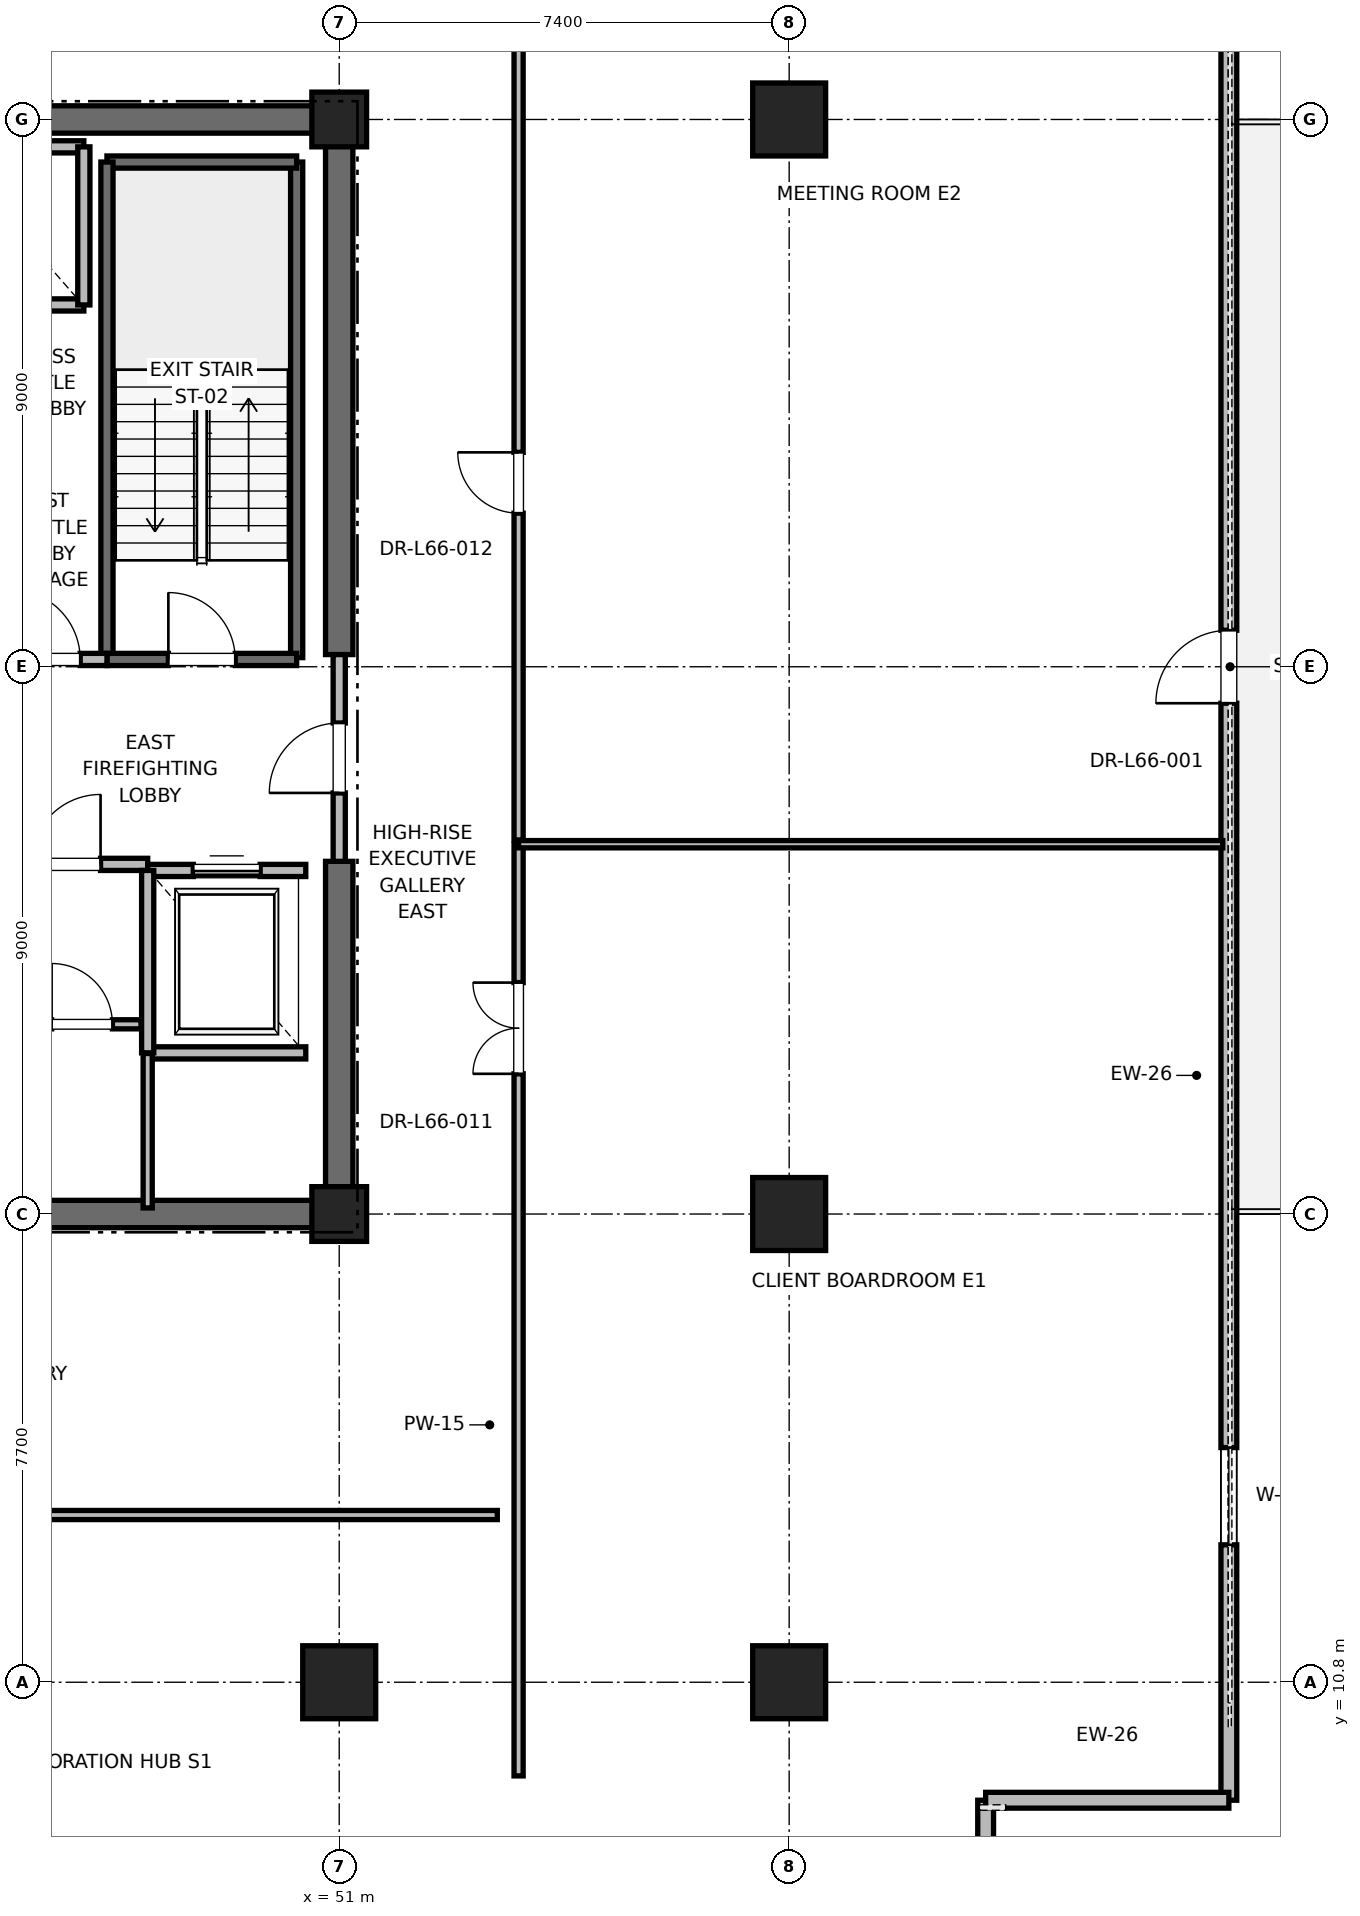
"""IFC4 building model, lengths in metres.
Left out: names, types, materials, properties, quantities, classifications, styles, units other than length and angle.
Written with IfcOpenShell. Run it as: python <this file> out.ifc"""

import sys

from ifc_helpers import new_model, si_unit, direction, frame, frame_2d, origin, origin_2d, place, context, subcontext, project, spatial, rectangle, extrude, element, fill, save


model = new_model("IFC4")
c1 = context("Model", 3, precision=1e-05, world=origin(), true_north=direction((0.0, 1.0)))
c2 = subcontext(c1, "Body", "Model", "MODEL_VIEW")
j1 = project(units=[si_unit("LENGTHUNIT", "METRE"), si_unit("PLANEANGLEUNIT", "RADIAN")], contexts=[c1])
p1 = place(None, origin())
s1 = spatial("IfcSite", under=j1, at=p1, CompositionType="ELEMENT")
p2 = place(p1, origin())
s2 = spatial("IfcBuilding", under=s1, at=p2, CompositionType="ELEMENT")
p3 = place(p2, frame((0.0, 0.0, 283.2)))
s3 = spatial("IfcBuildingStorey", under=s2, at=p3, CompositionType="ELEMENT", Elevation=283.2)
for number, where, z_axis, x_axis in (
    (1, (51.0, 10.8, 0.0), (0.0, 0.0, 1.0), (1.0, 0.0, 0.0)),
    (2, (58.4, 18.5, 0.0), (0.0, 0.0, 1.0), (1.0, 0.0, 0.0)),
    (3, (58.4, 36.5, 0.0), (0.0, 0.0, 1.0), (1.0, 0.0, 0.0)),
    (4, (58.4, 10.8, 0.0), (0.0, 0.0, 1.0), (1.0, 0.0, 0.0)),
):
    element("IfcColumn", number, at=place(p3, frame(where, z_axis=z_axis, x_axis=x_axis)), inside=s3, PredefinedType="COLUMN", context=c2, shape_type="SweptSolid", body=[
        extrude(rectangle(XDim=1.2, YDim=1.2, at=origin_2d()), origin(), (0.0, 0.0, 1.0), 4.0),
    ])
for number, where, z_axis, x_axis in (
    (5, (51.0, 18.5, 0.0), (0.0, 0.0, 1.0), (1.0, 0.0, 0.0)),
    (6, (51.0, 36.5, 0.0), (0.0, 0.0, 1.0), (1.0, 0.0, 0.0)),
):
    element("IfcColumn", number, at=place(p3, frame(where, z_axis=z_axis, x_axis=x_axis)), inside=s3, PredefinedType="PILASTER", context=c2, shape_type="SweptSolid", body=[
        extrude(rectangle(XDim=0.9, YDim=0.9, at=origin_2d()), origin(), (0.0, 0.0, 1.0), 4.0),
    ])
p4 = place(p3, frame((41.8, 18.5, 0.0), z_axis=(0.0, 0.0, 1.0), x_axis=(1.0, 0.0, 0.0)))
e7 = element("IfcWall", 7, at=p4, inside=s3, PredefinedType="SHEAR", context=c2, shape_type="SweptSolid", body=[
    extrude(rectangle(XDim=9.2, YDim=0.45, at=frame_2d((4.6, 0.0))), origin(), (0.0, 0.0, 1.0), 3.785),
])
for number, where, z_axis, x_axis in (
    (8, (45.2, 36.5, 0.0), (0.0, 0.0, 1.0), (1.0, 0.0, 0.0)),
    (9, (51.0, 18.5, 0.0), (0.0, 0.0, 1.0), (0.0, 1.0, 0.0)),
):
    element("IfcWall", number, at=place(p3, frame(where, z_axis=z_axis, x_axis=x_axis)), inside=s3, PredefinedType="SHEAR", context=c2, shape_type="SweptSolid", body=[
        extrude(rectangle(XDim=5.8, YDim=0.45, at=frame_2d((2.9, 0.0))), origin(), (0.0, 0.0, 1.0), 3.785),
    ])
p5 = place(p3, frame((51.0, 27.7, 0.0), z_axis=(0.0, 0.0, 1.0), x_axis=(0.0, 1.0, 0.0)))
e10 = element("IfcWall", 10, at=p5, inside=s3, PredefinedType="SHEAR", context=c2, shape_type="SweptSolid", body=[
    extrude(rectangle(XDim=8.8, YDim=0.45, at=frame_2d((4.4, 0.0))), origin(), (0.0, 0.0, 1.0), 3.785),
])
p6 = place(p3, frame((65.631, 8.86, 0.0), z_axis=(0.0, 0.0, 1.0), x_axis=(0.0, 1.0, 0.0)))
e11 = element("IfcWall", 11, at=p6, inside=s3, PredefinedType="PARAPET", context=c2, shape_type="SweptSolid", body=[
    extrude(rectangle(XDim=37.281, YDim=0.26, at=frame_2d((18.64, 0.0))), origin(), (0.0, 0.0, 1.0), 3.123),
])
p7 = place(p6, frame((4.2, 0.0, 0.85)))
e12 = element("IfcOpeningElement", 12, at=p7, cuts=e11, PredefinedType="OPENING", context=c2, shape_type="SweptSolid", body=[
    extrude(rectangle(XDim=1.6, YDim=2.1, at=frame_2d((0.8, 1.05))), frame((0.0, 0.13, 0.0), z_axis=(0.0, -1.0, 0.0), x_axis=(1.0, 0.0, 0.0)), (0.0, 0.0, 1.0), 0.26),
])
p8 = place(p6, frame((18.04, 0.0, 0.0)))
e13 = element("IfcOpeningElement", 13, at=p8, cuts=e11, PredefinedType="OPENING", context=c2, shape_type="SweptSolid", body=[
    extrude(rectangle(XDim=1.2, YDim=2.2, at=frame_2d((0.6, 1.1))), frame((0.0, 0.13, 0.0), z_axis=(0.0, -1.0, 0.0), x_axis=(1.0, 0.0, 0.0)), (0.0, 0.0, 1.0), 0.26),
])
p9 = place(p6, frame((31.481, 0.0, 0.85)))
e14 = element("IfcOpeningElement", 14, at=p9, cuts=e11, PredefinedType="OPENING", context=c2, shape_type="SweptSolid", body=[
    extrude(rectangle(XDim=1.6, YDim=2.1, at=frame_2d((0.8, 1.05))), frame((0.0, 0.13, 0.0), z_axis=(0.0, -1.0, 0.0), x_axis=(1.0, 0.0, 0.0)), (0.0, 0.0, 1.0), 0.26),
])
p10 = place(p3, frame((61.631, 5.36, 0.0), z_axis=(0.0, 0.0, 1.0), x_axis=(0.0, 1.0, 0.0)))
e15 = element("IfcWall", 15, at=p10, inside=s3, PredefinedType="PARAPET", context=c2, shape_type="SweptSolid", body=[
    extrude(rectangle(XDim=3.5, YDim=0.26, at=frame_2d((1.75, 0.0))), origin(), (0.0, 0.0, 1.0), 3.785),
])
p11 = place(p10, frame((0.85, 0.0, 0.85)))
e16 = element("IfcOpeningElement", 16, at=p11, cuts=e15, PredefinedType="OPENING", context=c2, shape_type="SweptSolid", body=[
    extrude(rectangle(XDim=1.8, YDim=2.2, at=frame_2d((0.9, 1.1))), frame((0.0, 0.13, 0.0), z_axis=(0.0, -1.0, 0.0), x_axis=(1.0, 0.0, 0.0)), (0.0, 0.0, 1.0), 0.26),
])
p12 = place(p3, frame((61.631, 8.86, 0.0), z_axis=(0.0, 0.0, 1.0), x_axis=(1.0, 0.0, 0.0)))
e17 = element("IfcWall", 17, at=p12, inside=s3, PredefinedType="PARAPET", context=c2, shape_type="SweptSolid", body=[
    extrude(rectangle(XDim=4.0, YDim=0.26, at=frame_2d((2.0, 0.0))), origin(), (0.0, 0.0, 1.0), 3.785),
])
p13 = place(p3, frame((50.3, 27.65, 0.0), z_axis=(0.0, 0.0, 1.0), x_axis=(0.0, 1.0, 0.0)))
e18 = element("IfcWall", 18, at=p13, inside=s3, PredefinedType="SOLIDWALL", context=c2, shape_type="SweptSolid", body=[
    extrude(rectangle(XDim=8.15, YDim=0.2, at=frame_2d((4.075, 0.0))), origin(), (0.0, 0.0, 1.0), 3.785),
])
p14 = place(p3, frame((47.18, 35.8, 0.0), z_axis=(0.0, 0.0, 1.0), x_axis=(1.0, 0.0, 0.0)))
e19 = element("IfcWall", 19, at=p14, inside=s3, PredefinedType="SOLIDWALL", context=c2, shape_type="SweptSolid", body=[
    extrude(rectangle(XDim=3.12, YDim=0.2, at=frame_2d((1.56, 0.0))), origin(), (0.0, 0.0, 1.0), 3.785),
])
p15 = place(p3, frame((47.18, 27.62, 0.0), z_axis=(0.0, 0.0, 1.0), x_axis=(0.0, 1.0, 0.0)))
e20 = element("IfcWall", 20, at=p15, inside=s3, PredefinedType="SOLIDWALL", context=c2, shape_type="SweptSolid", body=[
    extrude(rectangle(XDim=8.18, YDim=0.2, at=frame_2d((4.09, 0.0))), origin(), (0.0, 0.0, 1.0), 3.785),
])
p16 = place(p3, frame((47.18, 27.62, 0.0), z_axis=(0.0, 0.0, 1.0), x_axis=(1.0, 0.0, 0.0)))
e21 = element("IfcWall", 21, at=p16, inside=s3, PredefinedType="SOLIDWALL", context=c2, shape_type="SweptSolid", body=[
    extrude(rectangle(XDim=3.12, YDim=0.2, at=frame_2d((1.56, 0.0))), origin(), (0.0, 0.0, 1.0), 3.785),
])
p17 = place(p16, frame((1.01, 0.0, 0.0)))
e22 = element("IfcOpeningElement", 22, at=p17, cuts=e21, PredefinedType="OPENING", context=c2, shape_type="SweptSolid", body=[
    extrude(rectangle(XDim=1.1, YDim=2.15, at=frame_2d((0.55, 1.075))), frame((0.0, 0.1, 0.0), z_axis=(0.0, -1.0, 0.0), x_axis=(1.0, 0.0, 0.0)), (0.0, 0.0, 1.0), 0.2),
])
p18 = place(p3, frame((45.15, 24.25, 0.0), z_axis=(0.0, 0.0, 1.0), x_axis=(1.0, 0.0, 0.0)))
e23 = element("IfcWall", 23, at=p18, inside=s3, PredefinedType="PARTITIONING", context=c2, shape_type="SweptSolid", body=[
    extrude(rectangle(XDim=2.7, YDim=0.2, at=frame_2d((1.35, 0.0))), origin(), (0.0, 0.0, 1.0), 3.785),
])
p19 = place(p18, frame((0.775, 0.0, 0.0)))
e24 = element("IfcOpeningElement", 24, at=p19, cuts=e23, PredefinedType="OPENING", context=c2, shape_type="SweptSolid", body=[
    extrude(rectangle(XDim=1.15, YDim=2.2, at=frame_2d((0.575, 1.1))), frame((0.0, 0.1, 0.0), z_axis=(0.0, -1.0, 0.0), x_axis=(1.0, 0.0, 0.0)), (0.0, 0.0, 1.0), 0.2),
])
p20 = place(p3, frame((45.15, 27.62, 0.0), z_axis=(0.0, 0.0, 1.0), x_axis=(1.0, 0.0, 0.0)))
e25 = element("IfcWall", 25, at=p20, inside=s3, PredefinedType="PARTITIONING", context=c2, shape_type="SweptSolid", body=[
    extrude(rectangle(XDim=2.03, YDim=0.2, at=frame_2d((1.015, 0.0))), origin(), (0.0, 0.0, 1.0), 3.785),
])
p21 = place(p20, frame((0.44, 0.0, 0.0)))
e26 = element("IfcOpeningElement", 26, at=p21, cuts=e25, PredefinedType="OPENING", context=c2, shape_type="SweptSolid", body=[
    extrude(rectangle(XDim=1.15, YDim=2.2, at=frame_2d((0.575, 1.1))), frame((0.0, 0.1, 0.0), z_axis=(0.0, -1.0, 0.0), x_axis=(1.0, 0.0, 0.0)), (0.0, 0.0, 1.0), 0.2),
])
p22 = place(p3, frame((51.0, 24.3, 0.0), z_axis=(0.0, 0.0, 1.0), x_axis=(0.0, 1.0, 0.0)))
e27 = element("IfcWall", 27, at=p22, inside=s3, PredefinedType="PARTITIONING", context=c2, shape_type="SweptSolid", body=[
    extrude(rectangle(XDim=3.4, YDim=0.2, at=frame_2d((1.7, 0.0))), origin(), (0.0, 0.0, 1.0), 2.865),
])
p23 = place(p22, frame((1.125, 0.0, 0.0)))
e28 = element("IfcOpeningElement", 28, at=p23, cuts=e27, PredefinedType="OPENING", context=c2, shape_type="SweptSolid", body=[
    extrude(rectangle(XDim=1.15, YDim=2.2, at=frame_2d((0.575, 1.1))), frame((0.0, 0.1, 0.0), z_axis=(0.0, -1.0, 0.0), x_axis=(1.0, 0.0, 0.0)), (0.0, 0.0, 1.0), 0.2),
])
p24 = place(p3, frame((47.85, 21.15, 0.0), z_axis=(0.0, 0.0, 1.0), x_axis=(1.0, 0.0, 0.0)))
e29 = element("IfcWall", 29, at=p24, inside=s3, PredefinedType="SOLIDWALL", context=c2, shape_type="SweptSolid", body=[
    extrude(rectangle(XDim=2.6, YDim=0.2, at=frame_2d((1.3, 0.0))), origin(), (0.0, 0.0, 1.0), 3.785),
])
p25 = place(p3, frame((50.45, 24.15, 0.0), z_axis=(0.0, 0.0, 1.0), x_axis=(-1.0, 0.0, 0.0)))
e30 = element("IfcWall", 30, at=p25, inside=s3, PredefinedType="SOLIDWALL", context=c2, shape_type="SweptSolid", body=[
    extrude(rectangle(XDim=2.6, YDim=0.2, at=frame_2d((1.3, 0.0))), origin(), (0.0, 0.0, 1.0), 2.865),
])
p26 = place(p25, frame((0.75, 0.0, 0.0)))
e31 = element("IfcOpeningElement", 31, at=p26, cuts=e30, PredefinedType="OPENING", context=c2, shape_type="SweptSolid", body=[
    extrude(rectangle(XDim=1.1, YDim=2.2, at=frame_2d((0.55, 1.1))), frame((0.0, 0.1, 0.0), z_axis=(0.0, -1.0, 0.0), x_axis=(1.0, 0.0, 0.0)), (0.0, 0.0, 1.0), 0.2),
])
p27 = place(p3, frame((47.85, 24.15, 0.0), z_axis=(0.0, 0.0, 1.0), x_axis=(0.0, -1.0, 0.0)))
e32 = element("IfcWall", 32, at=p27, inside=s3, PredefinedType="SOLIDWALL", context=c2, shape_type="SweptSolid", body=[
    extrude(rectangle(XDim=3.0, YDim=0.2, at=frame_2d((1.5, 0.0))), origin(), (0.0, 0.0, 1.0), 3.785),
])
p28 = place(p3, frame((44.5, 33.45, 0.0), z_axis=(0.0, 0.0, 1.0), x_axis=(1.0, 0.0, 0.0)))
e33 = element("IfcWall", 33, at=p28, inside=s3, PredefinedType="SOLIDWALL", context=c2, shape_type="SweptSolid", body=[
    extrude(rectangle(XDim=2.3, YDim=0.2, at=frame_2d((1.15, 0.0))), origin(), (0.0, 0.0, 1.0), 3.785),
])
p29 = place(p3, frame((46.8, 36.05, 0.0), z_axis=(0.0, 0.0, 1.0), x_axis=(-1.0, 0.0, 0.0)))
e34 = element("IfcWall", 34, at=p29, inside=s3, PredefinedType="SOLIDWALL", context=c2, shape_type="SweptSolid", body=[
    extrude(rectangle(XDim=2.3, YDim=0.2, at=frame_2d((1.15, 0.0))), origin(), (0.0, 0.0, 1.0), 2.865),
])
p30 = place(p3, frame((46.8, 33.45, 0.0), z_axis=(0.0, 0.0, 1.0), x_axis=(0.0, 1.0, 0.0)))
e35 = element("IfcWall", 35, at=p30, inside=s3, PredefinedType="SOLIDWALL", context=c2, shape_type="SweptSolid", body=[
    extrude(rectangle(XDim=2.6, YDim=0.2, at=frame_2d((1.3, 0.0))), origin(), (0.0, 0.0, 1.0), 3.785),
])
p31 = place(p3, frame((47.85, 18.6, 0.0), z_axis=(0.0, 0.0, 1.0), x_axis=(0.0, 1.0, 0.0)))
e36 = element("IfcWall", 36, at=p31, inside=s3, PredefinedType="PARTITIONING", context=c2, shape_type="SweptSolid", body=[
    extrude(rectangle(XDim=2.54, YDim=0.15, at=frame_2d((1.27, 0.0))), origin(), (0.0, 0.0, 1.0), 2.85),
])
p32 = place(p3, frame((45.8, 21.62, 0.0), z_axis=(0.0, 0.0, 1.0), x_axis=(1.0, 0.0, 0.0)))
e37 = element("IfcWall", 37, at=p32, inside=s3, PredefinedType="PARTITIONING", context=c2, shape_type="SweptSolid", body=[
    extrude(rectangle(XDim=1.94, YDim=0.15, at=frame_2d((0.97, 0.0))), origin(), (0.0, 0.0, 1.0), 2.85),
])
p33 = place(p32, frame((0.47, 0.0, 0.0)))
e38 = element("IfcOpeningElement", 38, at=p33, cuts=e37, PredefinedType="OPENING", context=c2, shape_type="SweptSolid", body=[
    extrude(rectangle(XDim=1.0, YDim=2.15, at=frame_2d((0.5, 1.075))), frame((0.0, 0.075, 0.0), z_axis=(0.0, -1.0, 0.0), x_axis=(1.0, 0.0, 0.0)), (0.0, 0.0, 1.0), 0.15),
])
p34 = place(p3, frame((26.4, 13.55, 0.0), z_axis=(0.0, 0.0, 1.0), x_axis=(1.0, 0.0, 0.0)))
e39 = element("IfcWall", 39, at=p34, inside=s3, PredefinedType="PARTITIONING", context=c2, shape_type="SweptSolid", body=[
    extrude(rectangle(XDim=27.2, YDim=0.15, at=frame_2d((13.6, 0.0))), origin(), (0.0, 0.0, 1.0), 2.85),
])
p35 = place(p34, frame((13.1, 0.0, 0.0)))
e40 = element("IfcOpeningElement", 40, at=p35, cuts=e39, PredefinedType="OPENING", context=c2, shape_type="SweptSolid", body=[
    extrude(rectangle(XDim=1.0, YDim=2.15, at=frame_2d((0.5, 1.075))), frame((0.0, 0.075, 0.0), z_axis=(0.0, -1.0, 0.0), x_axis=(1.0, 0.0, 0.0)), (0.0, 0.0, 1.0), 0.15),
])
p36 = place(p3, frame((53.95, 9.26, 0.0), z_axis=(0.0, 0.0, 1.0), x_axis=(0.0, 1.0, 0.0)))
e41 = element("IfcWall", 41, at=p36, inside=s3, PredefinedType="PARTITIONING", context=c2, shape_type="SweptSolid", body=[
    extrude(rectangle(XDim=15.322, YDim=0.15, at=frame_2d((7.661, 0.0))), origin(), (0.0, 0.0, 1.0), 2.85),
])
p37 = place(p36, frame((11.546, 0.0, 0.0)))
e42 = element("IfcOpeningElement", 42, at=p37, cuts=e41, PredefinedType="OPENING", context=c2, shape_type="SweptSolid", body=[
    extrude(rectangle(XDim=1.5, YDim=2.25, at=frame_2d((0.75, 1.125))), frame((0.0, 0.075, 0.0), z_axis=(0.0, -1.0, 0.0), x_axis=(1.0, 0.0, 0.0)), (0.0, 0.0, 1.0), 0.15),
])
p38 = place(p3, frame((53.95, 24.582, 0.0), z_axis=(0.0, 0.0, 1.0), x_axis=(1.0, 0.0, 0.0)))
e43 = element("IfcWall", 43, at=p38, inside=s3, PredefinedType="PARTITIONING", context=c2, shape_type="SweptSolid", body=[
    extrude(rectangle(XDim=11.581, YDim=0.12, at=frame_2d((5.791, 0.0))), origin(), (0.0, 0.0, 1.0), 2.85),
])
p39 = place(p3, frame((53.95, 24.652, 0.0), z_axis=(0.0, 0.0, 1.0), x_axis=(0.0, 1.0, 0.0)))
e44 = element("IfcWall", 44, at=p39, inside=s3, PredefinedType="PARTITIONING", context=c2, shape_type="SweptSolid", body=[
    extrude(rectangle(XDim=21.089, YDim=0.15, at=frame_2d((10.544, 0.0))), origin(), (0.0, 0.0, 1.0), 2.85),
])
p40 = place(p39, frame((5.374, 0.0, 0.0)))
e45 = element("IfcOpeningElement", 45, at=p40, cuts=e44, PredefinedType="OPENING", context=c2, shape_type="SweptSolid", body=[
    extrude(rectangle(XDim=1.0, YDim=2.15, at=frame_2d((0.5, 1.075))), frame((0.0, 0.075, 0.0), z_axis=(0.0, -1.0, 0.0), x_axis=(1.0, 0.0, 0.0)), (0.0, 0.0, 1.0), 0.15),
])
p41 = place(p7, origin())
e46 = element("IfcWindow", 46, at=p41, inside=s3, PartitioningType="SINGLE_PANEL", PredefinedType="WINDOW", context=c2, shape_type="SweptSolid", body=[
    extrude(rectangle(XDim=1.6, YDim=2.1, at=frame_2d((0.8, 1.05))), frame((0.0, 0.03, 0.0), z_axis=(0.0, -1.0, 0.0), x_axis=(1.0, 0.0, 0.0)), (0.0, 0.0, 1.0), 0.06),
])
fill(e12, e46)
p42 = place(p8, origin())
e47 = element("IfcDoor", 47, at=p42, inside=s3, OperationType="SINGLE_SWING_LEFT", PredefinedType="DOOR", context=c2, shape_type="SweptSolid", body=[
    extrude(rectangle(XDim=1.2, YDim=2.2, at=frame_2d((0.6, 1.1))), frame((0.0, 0.025, 0.0), z_axis=(0.0, -1.0, 0.0), x_axis=(1.0, 0.0, 0.0)), (0.0, 0.0, 1.0), 0.05),
])
fill(e13, e47)
p43 = place(p17, origin())
e48 = element("IfcDoor", 48, at=p43, inside=s3, OperationType="SINGLE_SWING_LEFT", PredefinedType="DOOR", context=c2, shape_type="SweptSolid", body=[
    extrude(rectangle(XDim=1.1, YDim=2.15, at=frame_2d((0.55, 1.075))), frame((0.0, 0.025, 0.0), z_axis=(0.0, -1.0, 0.0), x_axis=(1.0, 0.0, 0.0)), (0.0, 0.0, 1.0), 0.05),
])
fill(e22, e48)
p44 = place(p19, origin())
e49 = element("IfcDoor", 49, at=p44, inside=s3, OperationType="SINGLE_SWING_RIGHT", PredefinedType="DOOR", context=c2, shape_type="SweptSolid", body=[
    extrude(rectangle(XDim=1.15, YDim=2.2, at=frame_2d((0.575, 1.1))), frame((0.0, 0.025, 0.0), z_axis=(0.0, -1.0, 0.0), x_axis=(1.0, 0.0, 0.0)), (0.0, 0.0, 1.0), 0.05),
])
fill(e24, e49)
p45 = place(p21, origin())
e50 = element("IfcDoor", 50, at=p45, inside=s3, OperationType="SINGLE_SWING_LEFT", PredefinedType="DOOR", context=c2, shape_type="SweptSolid", body=[
    extrude(rectangle(XDim=1.15, YDim=2.2, at=frame_2d((0.575, 1.1))), frame((0.0, 0.025, 0.0), z_axis=(0.0, -1.0, 0.0), x_axis=(1.0, 0.0, 0.0)), (0.0, 0.0, 1.0), 0.05),
])
fill(e26, e50)
p46 = place(p23, origin())
e51 = element("IfcDoor", 51, at=p46, inside=s3, OperationType="SINGLE_SWING_LEFT", PredefinedType="DOOR", context=c2, shape_type="SweptSolid", body=[
    extrude(rectangle(XDim=1.15, YDim=2.2, at=frame_2d((0.575, 1.1))), frame((0.0, 0.025, 0.0), z_axis=(0.0, -1.0, 0.0), x_axis=(1.0, 0.0, 0.0)), (0.0, 0.0, 1.0), 0.05),
])
fill(e28, e51)
p47 = place(p26, origin())
e52 = element("IfcDoor", 52, at=p47, inside=s3, OperationType="SLIDING_TO_RIGHT", PredefinedType="DOOR", context=c2, shape_type="SweptSolid", body=[
    extrude(rectangle(XDim=1.1, YDim=2.2, at=frame_2d((0.55, 1.1))), frame((0.0, 0.025, 0.0), z_axis=(0.0, -1.0, 0.0), x_axis=(1.0, 0.0, 0.0)), (0.0, 0.0, 1.0), 0.05),
])
fill(e31, e52)
p48 = place(p33, origin())
e53 = element("IfcDoor", 53, at=p48, inside=s3, OperationType="SINGLE_SWING_LEFT", PredefinedType="DOOR", context=c2, shape_type="SweptSolid", body=[
    extrude(rectangle(XDim=1.0, YDim=2.15, at=frame_2d((0.5, 1.075))), frame((0.0, 0.025, 0.0), z_axis=(0.0, -1.0, 0.0), x_axis=(1.0, 0.0, 0.0)), (0.0, 0.0, 1.0), 0.05),
])
fill(e38, e53)
p49 = place(p37, origin())
e54 = element("IfcDoor", 54, at=p49, inside=s3, OperationType="DOUBLE_DOOR_SINGLE_SWING", PredefinedType="DOOR", context=c2, shape_type="SweptSolid", body=[
    extrude(rectangle(XDim=1.5, YDim=2.25, at=frame_2d((0.75, 1.125))), frame((0.0, 0.025, 0.0), z_axis=(0.0, -1.0, 0.0), x_axis=(1.0, 0.0, 0.0)), (0.0, 0.0, 1.0), 0.05),
])
fill(e42, e54)
p50 = place(p40, origin())
e55 = element("IfcDoor", 55, at=p50, inside=s3, OperationType="SINGLE_SWING_RIGHT", PredefinedType="DOOR", context=c2, shape_type="SweptSolid", body=[
    extrude(rectangle(XDim=1.0, YDim=2.15, at=frame_2d((0.5, 1.075))), frame((0.0, 0.025, 0.0), z_axis=(0.0, -1.0, 0.0), x_axis=(1.0, 0.0, 0.0)), (0.0, 0.0, 1.0), 0.05),
])
fill(e45, e55)
save(model, sys.argv[1])
